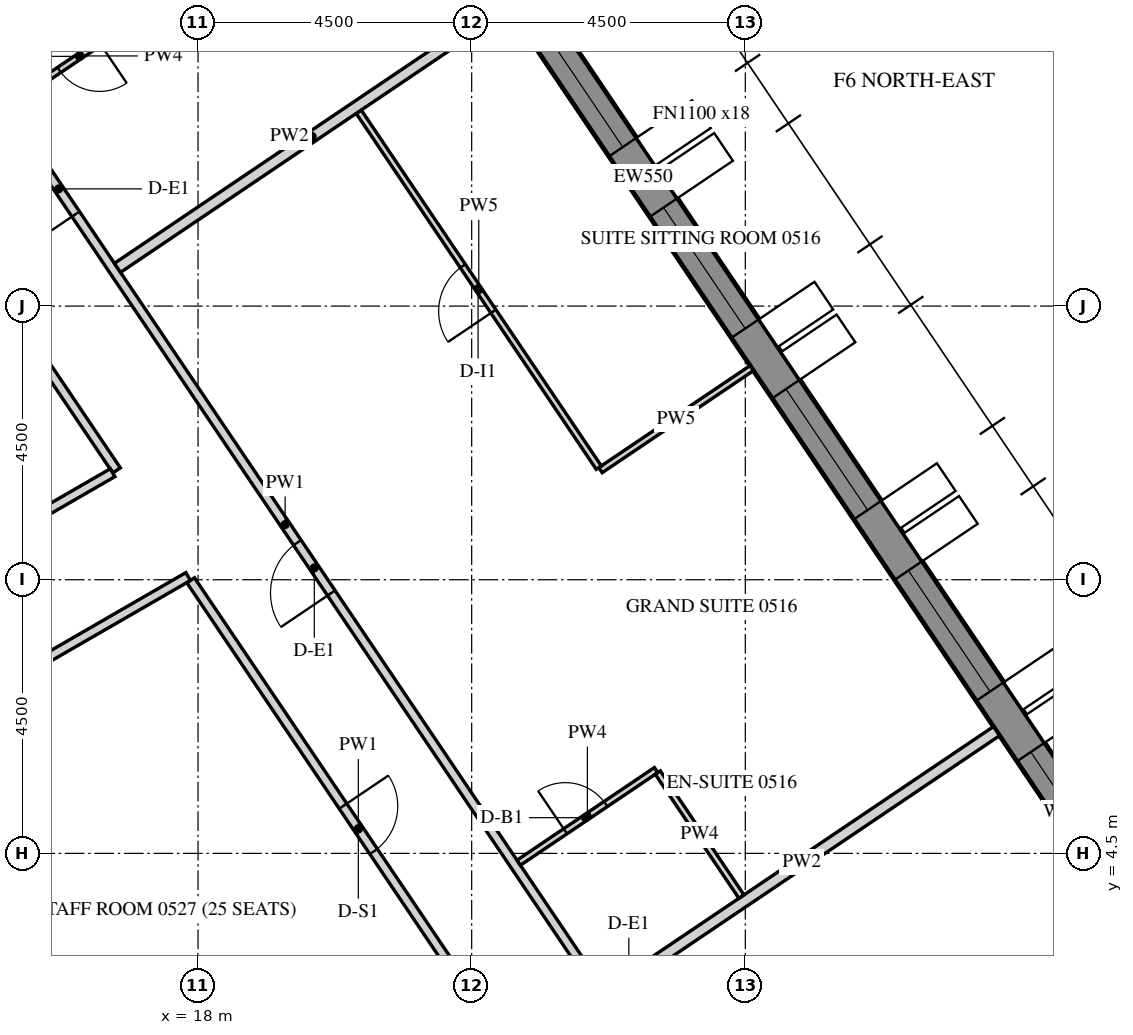
"""IFC4 building model, lengths in metres.
Left out: names, types, materials, properties, quantities, classifications, styles, units other than length and angle.
Written with IfcOpenShell. Run it as: python <this file> out.ifc"""

import sys

from ifc_helpers import new_model, si_unit, direction, frame, frame_2d, origin, place, context, subcontext, project, spatial, polyline, rectangle, outline, extrude, element, fill, save


model = new_model("IFC4")
c1 = context("Model", 3, precision=1e-05, world=origin(), true_north=direction((0.0, 1.0)))
c2 = subcontext(c1, "Body", "Model", "MODEL_VIEW")
j1 = project(units=[si_unit("LENGTHUNIT", "METRE"), si_unit("PLANEANGLEUNIT", "RADIAN")], contexts=[c1])
p1 = place(None, origin())
s1 = spatial("IfcSite", under=j1, at=p1, CompositionType="ELEMENT")
p2 = place(p1, origin())
s2 = spatial("IfcBuilding", under=s1, at=p2, CompositionType="ELEMENT")
p3 = place(p2, frame((0.0, 0.0, 80.4)))
s3 = spatial("IfcBuildingStorey", under=s2, at=p3, CompositionType="ELEMENT", Elevation=80.4)
p4 = place(p3, frame((33.728, 3.153, -0.15), z_axis=(0.0, 0.0, 1.0), x_axis=(-0.559192411416, 0.82903790445, 0.0)))
e1 = element("IfcWall", 1, at=p4, inside=s3, PredefinedType="SOLIDWALL", context=c2, shape_type="SweptSolid", body=[
    extrude(outline(polyline([(-0.026, -0.275), (30.093, -0.275), (30.048, 0.275), (0.026, 0.275), (-0.026, -0.275)])), origin(), (0.0, 0.0, 1.0), 3.9),
])
p5 = place(p4, frame((1.236, 0.0, 1.05)))
e2 = element("IfcOpeningElement", 2, at=p5, cuts=e1, PredefinedType="OPENING", context=c2, shape_type="SweptSolid", body=[
    extrude(rectangle(XDim=2.4, YDim=2.4, at=frame_2d((1.2, 1.2))), frame((0.0, 0.285, 0.0), z_axis=(0.0, -1.0, 0.0), x_axis=(1.0, 0.0, 0.0)), (0.0, 0.0, 1.0), 0.57),
])
p6 = place(p4, frame((4.835, 0.0, 1.05)))
e3 = element("IfcOpeningElement", 3, at=p6, cuts=e1, PredefinedType="OPENING", context=c2, shape_type="SweptSolid", body=[
    extrude(rectangle(XDim=2.4, YDim=2.4, at=frame_2d((1.2, 1.2))), frame((0.0, 0.285, 0.0), z_axis=(0.0, -1.0, 0.0), x_axis=(1.0, 0.0, 0.0)), (0.0, 0.0, 1.0), 0.57),
])
p7 = place(p4, frame((8.436, 0.0, 1.05)))
e4 = element("IfcOpeningElement", 4, at=p7, cuts=e1, PredefinedType="OPENING", context=c2, shape_type="SweptSolid", body=[
    extrude(rectangle(XDim=2.4, YDim=2.4, at=frame_2d((1.2, 1.2))), frame((0.0, 0.285, 0.0), z_axis=(0.0, -1.0, 0.0), x_axis=(1.0, 0.0, 0.0)), (0.0, 0.0, 1.0), 0.57),
])
p8 = place(p4, frame((12.035, 0.0, 1.05)))
e5 = element("IfcOpeningElement", 5, at=p8, cuts=e1, PredefinedType="OPENING", context=c2, shape_type="SweptSolid", body=[
    extrude(rectangle(XDim=2.4, YDim=2.4, at=frame_2d((1.2, 1.2))), frame((0.0, 0.285, 0.0), z_axis=(0.0, -1.0, 0.0), x_axis=(1.0, 0.0, 0.0)), (0.0, 0.0, 1.0), 0.57),
])
p9 = place(p4, frame((15.635, 0.0, 1.05)))
e6 = element("IfcOpeningElement", 6, at=p9, cuts=e1, PredefinedType="OPENING", context=c2, shape_type="SweptSolid", body=[
    extrude(rectangle(XDim=2.4, YDim=2.4, at=frame_2d((1.2, 1.2))), frame((0.0, 0.285, 0.0), z_axis=(0.0, -1.0, 0.0), x_axis=(1.0, 0.0, 0.0)), (0.0, 0.0, 1.0), 0.57),
])
p10 = place(p4, frame((19.236, 0.0, 1.05)))
e7 = element("IfcOpeningElement", 7, at=p10, cuts=e1, PredefinedType="OPENING", context=c2, shape_type="SweptSolid", body=[
    extrude(rectangle(XDim=2.4, YDim=2.4, at=frame_2d((1.2, 1.2))), frame((0.0, 0.285, 0.0), z_axis=(0.0, -1.0, 0.0), x_axis=(1.0, 0.0, 0.0)), (0.0, 0.0, 1.0), 0.57),
])
p11 = place(p4, frame((22.835, 0.0, 1.05)))
e8 = element("IfcOpeningElement", 8, at=p11, cuts=e1, PredefinedType="OPENING", context=c2, shape_type="SweptSolid", body=[
    extrude(rectangle(XDim=2.4, YDim=2.4, at=frame_2d((1.2, 1.2))), frame((0.0, 0.285, 0.0), z_axis=(0.0, -1.0, 0.0), x_axis=(1.0, 0.0, 0.0)), (0.0, 0.0, 1.0), 0.57),
])
p12 = place(p4, frame((26.436, 0.0, 1.05)))
e9 = element("IfcOpeningElement", 9, at=p12, cuts=e1, PredefinedType="OPENING", context=c2, shape_type="SweptSolid", body=[
    extrude(rectangle(XDim=2.4, YDim=2.4, at=frame_2d((1.2, 1.2))), frame((0.0, 0.285, 0.0), z_axis=(0.0, -1.0, 0.0), x_axis=(1.0, 0.0, 0.0)), (0.0, 0.0, 1.0), 0.57),
])
p13 = place(p3, frame((15.819, 0.0, -0.15), z_axis=(0.0, 0.0, 1.0), x_axis=(-0.499999880136, 0.866025472988, 0.0)))
e10 = element("IfcWall", 10, at=p13, inside=s3, PredefinedType="SHEAR", context=c2, shape_type="SweptSolid", body=[
    extrude(outline(polyline([(-0.173, -0.3), (15.993, -0.3), (15.646, 0.3), (0.173, 0.3), (-0.173, -0.3)])), origin(), (0.0, 0.0, 1.0), 3.9),
])
p14 = place(p13, frame((6.981, 0.0, 0.15)))
e11 = element("IfcOpeningElement", 11, at=p14, cuts=e10, PredefinedType="OPENING", context=c2, shape_type="SweptSolid", body=[
    extrude(rectangle(XDim=1.8, YDim=2.4, at=frame_2d((0.9, 1.2))), frame((0.0, 0.31, 0.0), z_axis=(0.0, -1.0, 0.0), x_axis=(1.0, 0.0, 0.0)), (0.0, 0.0, 1.0), 0.62),
])
p15 = place(p3, frame((8.083, 14.0, -0.15), z_axis=(0.0, 0.0, 1.0), x_axis=(0.499997680643, 0.866026742862, 0.0)))
e12 = element("IfcWall", 12, at=p15, inside=s3, PredefinedType="SHEAR", context=c2, shape_type="SweptSolid", body=[
    extrude(rectangle(XDim=16.509, YDim=0.6, at=frame_2d((8.254, 0.0))), origin(), (0.0, 0.0, 1.0), 3.9),
])
p16 = place(p15, frame((7.354, 0.0, 0.15)))
e13 = element("IfcOpeningElement", 13, at=p16, cuts=e12, PredefinedType="OPENING", context=c2, shape_type="SweptSolid", body=[
    extrude(rectangle(XDim=1.8, YDim=2.4, at=frame_2d((0.9, 1.2))), frame((0.0, 0.31, 0.0), z_axis=(0.0, -1.0, 0.0), x_axis=(1.0, 0.0, 0.0)), (0.0, 0.0, 1.0), 0.62),
])
p17 = place(p3, frame((25.467, 0.96, 0.0), z_axis=(0.0, 0.0, 1.0), x_axis=(-0.559192112521, 0.829038106057, 0.0)))
e14 = element("IfcWall", 14, at=p17, inside=s3, PredefinedType="PARTITIONING", context=c2, shape_type="SweptSolid", body=[
    extrude(rectangle(XDim=21.584, YDim=0.15, at=frame_2d((10.792, 0.0))), origin(), (0.0, 0.0, 1.0), 2.988),
])
p18 = place(p17, frame((0.184, 0.0, 0.0)))
e15 = element("IfcOpeningElement", 15, at=p18, cuts=e14, PredefinedType="OPENING", context=c2, shape_type="SweptSolid", body=[
    extrude(rectangle(XDim=1.0, YDim=2.1, at=frame_2d((0.5, 1.05))), frame((0.0, 0.085, 0.0), z_axis=(0.0, -1.0, 0.0), x_axis=(1.0, 0.0, 0.0)), (0.0, 0.0, 1.0), 0.17),
])
p19 = place(p17, frame((9.434, 0.0, 0.0)))
e16 = element("IfcOpeningElement", 16, at=p19, cuts=e14, PredefinedType="OPENING", context=c2, shape_type="SweptSolid", body=[
    extrude(rectangle(XDim=1.0, YDim=2.1, at=frame_2d((0.5, 1.05))), frame((0.0, 0.085, 0.0), z_axis=(0.0, -1.0, 0.0), x_axis=(1.0, 0.0, 0.0)), (0.0, 0.0, 1.0), 0.17),
])
p20 = place(p17, frame((16.951, 0.0, 0.0)))
e17 = element("IfcOpeningElement", 17, at=p20, cuts=e14, PredefinedType="OPENING", context=c2, shape_type="SweptSolid", body=[
    extrude(rectangle(XDim=1.0, YDim=2.1, at=frame_2d((0.5, 1.05))), frame((0.0, 0.085, 0.0), z_axis=(0.0, -1.0, 0.0), x_axis=(1.0, 0.0, 0.0)), (0.0, 0.0, 1.0), 0.17),
])
p21 = place(p3, frame((12.664, 6.066, 0.0), z_axis=(0.0, 0.0, 1.0), x_axis=(0.866018848283, 0.500011354289, 0.0)))
e18 = element("IfcWall", 18, at=p21, inside=s3, PredefinedType="PARTITIONING", context=c2, shape_type="SweptSolid", body=[
    extrude(rectangle(XDim=5.974, YDim=0.15, at=frame_2d((2.987, 0.0))), origin(), (0.0, 0.0, 1.0), 2.988),
])
p22 = place(p3, frame((17.879, 8.99, 0.0), z_axis=(0.0, 0.0, 1.0), x_axis=(0.559189565351, -0.829039824136, 0.0)))
e19 = element("IfcWall", 19, at=p22, inside=s3, PredefinedType="PARTITIONING", context=c2, shape_type="SweptSolid", body=[
    extrude(rectangle(XDim=9.859, YDim=0.15, at=frame_2d((4.929, 0.0))), origin(), (0.0, 0.0, 1.0), 2.988),
])
p23 = place(p22, frame((4.479, 0.0, 0.0)))
e20 = element("IfcOpeningElement", 20, at=p23, cuts=e19, PredefinedType="OPENING", context=c2, shape_type="SweptSolid", body=[
    extrude(rectangle(XDim=0.9, YDim=2.1, at=frame_2d((0.45, 1.05))), frame((0.0, 0.085, 0.0), z_axis=(0.0, -1.0, 0.0), x_axis=(1.0, 0.0, 0.0)), (0.0, 0.0, 1.0), 0.17),
])
p24 = place(p3, frame((11.298, 18.748, 0.0), z_axis=(0.0, 0.0, 1.0), x_axis=(0.559198234291, -0.829033976847, 0.0)))
e21 = element("IfcWall", 21, at=p24, inside=s3, PredefinedType="PARTITIONING", context=c2, shape_type="SweptSolid", body=[
    extrude(rectangle(XDim=9.59, YDim=0.15, at=frame_2d((4.795, 0.0))), origin(), (0.0, 0.0, 1.0), 2.988),
])
p25 = place(p24, frame((4.345, 0.0, 0.0)))
e22 = element("IfcOpeningElement", 22, at=p25, cuts=e21, PredefinedType="OPENING", context=c2, shape_type="SweptSolid", body=[
    extrude(rectangle(XDim=0.9, YDim=2.1, at=frame_2d((0.45, 1.05))), frame((0.0, 0.085, 0.0), z_axis=(0.0, -1.0, 0.0), x_axis=(1.0, 0.0, 0.0)), (0.0, 0.0, 1.0), 0.17),
])
p26 = place(p3, frame((16.595, 10.76, 0.0), z_axis=(0.0, 0.0, 1.0), x_axis=(-0.866019477104, -0.500010265171, 0.0)))
e23 = element("IfcWall", 23, at=p26, inside=s3, PredefinedType="PARTITIONING", context=c2, shape_type="SweptSolid", body=[
    extrude(rectangle(XDim=5.752, YDim=0.15, at=frame_2d((2.876, 0.0))), origin(), (0.0, 0.0, 1.0), 2.988),
])
p27 = place(p3, frame((31.132, 6.51, 0.0), z_axis=(0.0, 0.0, 1.0), x_axis=(-0.829047937134, -0.559177537043, 0.0)))
e24 = element("IfcWall", 24, at=p27, inside=s3, PredefinedType="PARTITIONING", context=c2, shape_type="SweptSolid", body=[
    extrude(rectangle(XDim=7.725, YDim=0.18, at=frame_2d((3.862, 0.0))), origin(), (0.0, 0.0, 1.0), 2.988),
])
p28 = place(p3, frame((23.273, 4.346, 0.0), z_axis=(0.0, 0.0, 1.0), x_axis=(0.829005477618, 0.559240483226, 0.0)))
e25 = element("IfcWall", 25, at=p28, inside=s3, PredefinedType="PARTITIONING", context=c2, shape_type="SweptSolid", body=[
    extrude(rectangle(XDim=2.725, YDim=0.1, at=frame_2d((1.363, 0.0))), origin(), (0.0, 0.0, 1.0), 2.988),
])
p29 = place(p28, frame((0.925, 0.0, 0.0)))
e26 = element("IfcOpeningElement", 26, at=p29, cuts=e25, PredefinedType="OPENING", context=c2, shape_type="SweptSolid", body=[
    extrude(rectangle(XDim=0.8, YDim=2.1, at=frame_2d((0.4, 1.05))), frame((0.0, 0.06, 0.0), z_axis=(0.0, -1.0, 0.0), x_axis=(1.0, 0.0, 0.0)), (0.0, 0.0, 1.0), 0.12),
])
p30 = place(p3, frame((25.561, 5.829, 0.0), z_axis=(0.0, 0.0, 1.0), x_axis=(0.559249542518, -0.82899936622, 0.0)))
e27 = element("IfcWall", 27, at=p30, inside=s3, PredefinedType="PARTITIONING", context=c2, shape_type="SweptSolid", body=[
    extrude(rectangle(XDim=2.46, YDim=0.1, at=frame_2d((1.23, 0.0))), origin(), (0.0, 0.0, 1.0), 2.988),
])
p31 = place(p3, frame((27.105, 12.48, 0.0), z_axis=(0.0, 0.0, 1.0), x_axis=(-0.829008079006, -0.559236626968, 0.0)))
e28 = element("IfcWall", 28, at=p31, inside=s3, PredefinedType="PARTITIONING", context=c2, shape_type="SweptSolid", body=[
    extrude(rectangle(XDim=3.0, YDim=0.1, at=frame_2d((1.5, 0.0))), origin(), (0.0, 0.0, 1.0), 2.988),
])
p32 = place(p3, frame((24.59, 10.844, 0.0), z_axis=(0.0, 0.0, 1.0), x_axis=(-0.559177045947, 0.829048268369, 0.0)))
e29 = element("IfcWall", 29, at=p32, inside=s3, PredefinedType="PARTITIONING", context=c2, shape_type="SweptSolid", body=[
    extrude(rectangle(XDim=7.06, YDim=0.1, at=frame_2d((3.53, 0.0))), origin(), (0.0, 0.0, 1.0), 2.988),
])
p33 = place(p32, frame((3.1, 0.0, 0.0)))
e30 = element("IfcOpeningElement", 30, at=p33, cuts=e29, PredefinedType="OPENING", context=c2, shape_type="SweptSolid", body=[
    extrude(rectangle(XDim=0.9, YDim=2.1, at=frame_2d((0.45, 1.05))), frame((0.0, 0.06, 0.0), z_axis=(0.0, -1.0, 0.0), x_axis=(1.0, 0.0, 0.0)), (0.0, 0.0, 1.0), 0.12),
])
p34 = place(p3, frame((23.079, 18.449, 0.0), z_axis=(0.0, 0.0, 1.0), x_axis=(-0.82903328576, -0.559199258853, 0.0)))
e31 = element("IfcWall", 31, at=p34, inside=s3, PredefinedType="PARTITIONING", context=c2, shape_type="SweptSolid", body=[
    extrude(rectangle(XDim=7.725, YDim=0.18, at=frame_2d((3.863, 0.0))), origin(), (0.0, 0.0, 1.0), 2.988),
])
p35 = place(p3, frame((17.25, 18.418, 0.0), z_axis=(0.0, 0.0, 1.0), x_axis=(-0.82904649496, -0.559179675234, 0.0)))
e32 = element("IfcWall", 32, at=p35, inside=s3, PredefinedType="PARTITIONING", context=c2, shape_type="SweptSolid", body=[
    extrude(rectangle(XDim=2.875, YDim=0.1, at=frame_2d((1.438, 0.0))), origin(), (0.0, 0.0, 1.0), 2.988),
])
p36 = place(p35, frame((1.05, 0.0, 0.0)))
e33 = element("IfcOpeningElement", 33, at=p36, cuts=e32, PredefinedType="OPENING", context=c2, shape_type="SweptSolid", body=[
    extrude(rectangle(XDim=0.8, YDim=2.1, at=frame_2d((0.4, 1.05))), frame((0.0, 0.06, 0.0), z_axis=(0.0, -1.0, 0.0), x_axis=(1.0, 0.0, 0.0)), (0.0, 0.0, 1.0), 0.12),
])
p37 = place(p5, frame((0.0, 0.205, 0.0)))
e34 = element("IfcWindow", 34, at=p37, inside=s3, PartitioningType="DOUBLE_PANEL_VERTICAL", PredefinedType="WINDOW", context=c2, shape_type="SweptSolid", body=[
    extrude(rectangle(XDim=2.4, YDim=2.4, at=frame_2d((1.2, 1.2))), frame((0.0, 0.03, 0.0), z_axis=(0.0, -1.0, 0.0), x_axis=(1.0, 0.0, 0.0)), (0.0, 0.0, 1.0), 0.06),
])
fill(e2, e34)
p38 = place(p6, frame((0.0, 0.205, 0.0)))
e35 = element("IfcWindow", 35, at=p38, inside=s3, PartitioningType="DOUBLE_PANEL_VERTICAL", PredefinedType="WINDOW", context=c2, shape_type="SweptSolid", body=[
    extrude(rectangle(XDim=2.4, YDim=2.4, at=frame_2d((1.2, 1.2))), frame((0.0, 0.03, 0.0), z_axis=(0.0, -1.0, 0.0), x_axis=(1.0, 0.0, 0.0)), (0.0, 0.0, 1.0), 0.06),
])
fill(e3, e35)
p39 = place(p7, frame((0.0, 0.205, 0.0)))
e36 = element("IfcWindow", 36, at=p39, inside=s3, PartitioningType="DOUBLE_PANEL_VERTICAL", PredefinedType="WINDOW", context=c2, shape_type="SweptSolid", body=[
    extrude(rectangle(XDim=2.4, YDim=2.4, at=frame_2d((1.2, 1.2))), frame((0.0, 0.03, 0.0), z_axis=(0.0, -1.0, 0.0), x_axis=(1.0, 0.0, 0.0)), (0.0, 0.0, 1.0), 0.06),
])
fill(e4, e36)
p40 = place(p8, frame((0.0, 0.205, 0.0)))
e37 = element("IfcWindow", 37, at=p40, inside=s3, PartitioningType="DOUBLE_PANEL_VERTICAL", PredefinedType="WINDOW", context=c2, shape_type="SweptSolid", body=[
    extrude(rectangle(XDim=2.4, YDim=2.4, at=frame_2d((1.2, 1.2))), frame((0.0, 0.03, 0.0), z_axis=(0.0, -1.0, 0.0), x_axis=(1.0, 0.0, 0.0)), (0.0, 0.0, 1.0), 0.06),
])
fill(e5, e37)
p41 = place(p9, frame((0.0, 0.205, 0.0)))
e38 = element("IfcWindow", 38, at=p41, inside=s3, PartitioningType="DOUBLE_PANEL_VERTICAL", PredefinedType="WINDOW", context=c2, shape_type="SweptSolid", body=[
    extrude(rectangle(XDim=2.4, YDim=2.4, at=frame_2d((1.2, 1.2))), frame((0.0, 0.03, 0.0), z_axis=(0.0, -1.0, 0.0), x_axis=(1.0, 0.0, 0.0)), (0.0, 0.0, 1.0), 0.06),
])
fill(e6, e38)
p42 = place(p19, origin())
e39 = element("IfcDoor", 39, at=p42, inside=s3, OperationType="SINGLE_SWING_LEFT", PredefinedType="DOOR", context=c2, shape_type="SweptSolid", body=[
    extrude(rectangle(XDim=1.0, YDim=2.1, at=frame_2d((0.5, 1.05))), frame((0.0, 0.025, 0.0), z_axis=(0.0, -1.0, 0.0), x_axis=(1.0, 0.0, 0.0)), (0.0, 0.0, 1.0), 0.05),
])
fill(e16, e39)
p43 = place(p29, origin())
e40 = element("IfcDoor", 40, at=p43, inside=s3, OperationType="SINGLE_SWING_RIGHT", PredefinedType="DOOR", context=c2, shape_type="SweptSolid", body=[
    extrude(rectangle(XDim=0.8, YDim=2.1, at=frame_2d((0.4, 1.05))), frame((0.0, 0.025, 0.0), z_axis=(0.0, -1.0, 0.0), x_axis=(1.0, 0.0, 0.0)), (0.0, 0.0, 1.0), 0.05),
])
fill(e26, e40)
p44 = place(p33, origin())
e41 = element("IfcDoor", 41, at=p44, inside=s3, OperationType="SINGLE_SWING_RIGHT", PredefinedType="DOOR", context=c2, shape_type="SweptSolid", body=[
    extrude(rectangle(XDim=0.9, YDim=2.1, at=frame_2d((0.45, 1.05))), frame((0.0, 0.025, 0.0), z_axis=(0.0, -1.0, 0.0), x_axis=(1.0, 0.0, 0.0)), (0.0, 0.0, 1.0), 0.05),
])
fill(e30, e41)
p45 = place(p20, origin())
e42 = element("IfcDoor", 42, at=p45, inside=s3, OperationType="SINGLE_SWING_RIGHT", PredefinedType="DOOR", context=c2, shape_type="SweptSolid", body=[
    extrude(rectangle(XDim=1.0, YDim=2.1, at=frame_2d((0.5, 1.05))), frame((0.0, 0.025, 0.0), z_axis=(0.0, -1.0, 0.0), x_axis=(1.0, 0.0, 0.0)), (0.0, 0.0, 1.0), 0.05),
])
fill(e17, e42)
p46 = place(p36, origin())
e43 = element("IfcDoor", 43, at=p46, inside=s3, OperationType="SINGLE_SWING_LEFT", PredefinedType="DOOR", context=c2, shape_type="SweptSolid", body=[
    extrude(rectangle(XDim=0.8, YDim=2.1, at=frame_2d((0.4, 1.05))), frame((0.0, 0.025, 0.0), z_axis=(0.0, -1.0, 0.0), x_axis=(1.0, 0.0, 0.0)), (0.0, 0.0, 1.0), 0.05),
])
fill(e33, e43)
p47 = place(p23, origin())
e44 = element("IfcDoor", 44, at=p47, inside=s3, OperationType="SINGLE_SWING_RIGHT", PredefinedType="DOOR", context=c2, shape_type="SweptSolid", body=[
    extrude(rectangle(XDim=0.9, YDim=2.1, at=frame_2d((0.45, 1.05))), frame((0.0, 0.025, 0.0), z_axis=(0.0, -1.0, 0.0), x_axis=(1.0, 0.0, 0.0)), (0.0, 0.0, 1.0), 0.05),
])
fill(e20, e44)
save(model, sys.argv[1])
